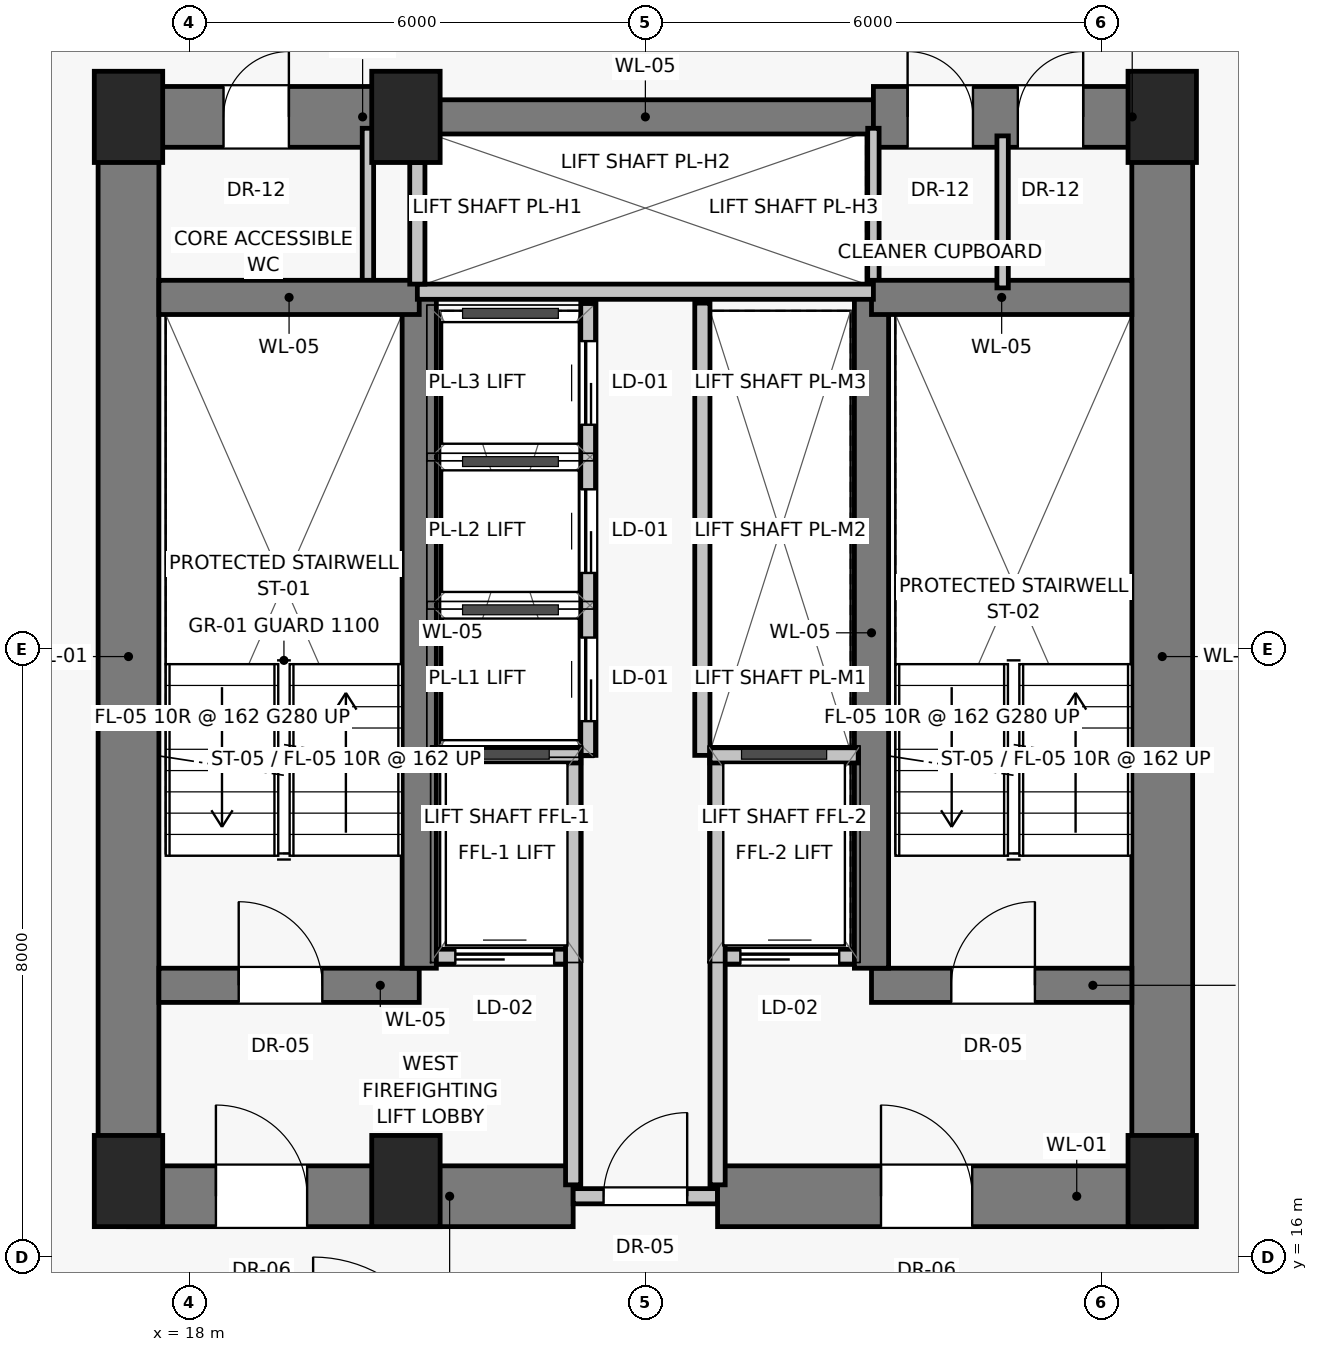
"""IFC4 building model, lengths in metres.
Left out: names, types, materials, properties, quantities, classifications, styles, units other than length and angle.
Written with IfcOpenShell. Run it as: python <this file> out.ifc"""

import sys

from ifc_helpers import new_model, si_unit, direction, frame, frame_2d, origin, origin_2d, place, context, subcontext, project, spatial, rectangle, extrude, source, transform, mapped, element, fill, save


model = new_model("IFC4")
c1 = context("Model", 3, precision=1e-05, world=origin(), true_north=direction((0.0, 1.0)))
c2 = subcontext(c1, "Body", "Model", "MODEL_VIEW")
j1 = project(units=[si_unit("LENGTHUNIT", "METRE"), si_unit("PLANEANGLEUNIT", "RADIAN")], contexts=[c1])
p1 = place(None, origin())
s1 = spatial("IfcSite", under=j1, at=p1, CompositionType="ELEMENT")
p2 = place(p1, origin())
s2 = spatial("IfcBuilding", under=s1, at=p2, CompositionType="ELEMENT")
p3 = place(p2, frame((0.0, 0.0, 53.3)))
s3 = spatial("IfcBuildingStorey", under=s2, at=p3, CompositionType="ELEMENT", Elevation=53.3)
for number, where, z_axis, x_axis in (
    (1, (17.2, 17.0, 0.0), (0.0, 0.0, 1.0), (1.0, 0.0, 0.0)),
    (2, (20.85, 17.0, 0.0), (0.0, 0.0, 1.0), (1.0, 0.0, 0.0)),
    (3, (30.8, 17.0, 0.0), (0.0, 0.0, 1.0), (1.0, 0.0, 0.0)),
    (4, (17.2, 31.0, 0.0), (0.0, 0.0, 1.0), (1.0, 0.0, 0.0)),
    (5, (20.85, 31.0, 0.0), (0.0, 0.0, 1.0), (1.0, 0.0, 0.0)),
    (6, (30.8, 31.0, 0.0), (0.0, 0.0, 1.0), (1.0, 0.0, 0.0)),
):
    element("IfcColumn", number, at=place(p3, frame(where, z_axis=z_axis, x_axis=x_axis)), inside=s3, PredefinedType="PILASTER", context=c2, shape_type="SweptSolid", body=[
        extrude(rectangle(XDim=0.9, YDim=1.2, at=origin_2d()), origin(), (0.0, 0.0, 1.0), 3.25),
    ])
for number, where, z_axis, x_axis in (
    (7, (17.2, 16.8, 0.0), (0.0, 0.0, 1.0), (0.0, 1.0, 0.0)),
    (8, (30.8, 16.8, 0.0), (0.0, 0.0, 1.0), (0.0, 1.0, 0.0)),
):
    element("IfcWall", number, at=place(p3, frame(where, z_axis=z_axis, x_axis=x_axis)), inside=s3, PredefinedType="SHEAR", context=c2, shape_type="SweptSolid", body=[
        extrude(rectangle(XDim=14.2, YDim=0.8, at=frame_2d((7.1, 0.0))), origin(), (0.0, 0.0, 1.0), 2.97),
    ])
p4 = place(p3, frame((17.2, 16.8, 0.0), z_axis=(0.0, 0.0, 1.0), x_axis=(1.0, 0.0, 0.0)))
e9 = element("IfcWall", 9, at=p4, inside=s3, PredefinedType="SHEAR", context=c2, shape_type="SweptSolid", body=[
    extrude(rectangle(XDim=5.85, YDim=0.8, at=frame_2d((2.925, 0.0))), origin(), (0.0, 0.0, 1.0), 2.97),
])
p5 = place(p4, frame((1.15, 0.0, 0.0)))
e10 = element("IfcOpeningElement", 10, at=p5, cuts=e9, PredefinedType="OPENING", context=c2, shape_type="SweptSolid", body=[
    extrude(rectangle(XDim=1.2, YDim=2.03, at=frame_2d((0.6, 1.015))), frame((0.0, 0.41, 0.0), z_axis=(0.0, -1.0, 0.0), x_axis=(1.0, 0.0, 0.0)), (0.0, 0.0, 1.0), 0.82),
])
p6 = place(p3, frame((23.05, 16.8, 0.0), z_axis=(0.0, 0.0, 1.0), x_axis=(1.0, 0.0, 0.0)))
e11 = element("IfcWall", 11, at=p6, inside=s3, PredefinedType="SOLIDWALL", context=c2, shape_type="SweptSolid", body=[
    extrude(rectangle(XDim=1.9, YDim=0.2, at=frame_2d((0.95, 0.0))), origin(), (0.0, 0.0, 1.0), 2.12),
])
p7 = place(p6, frame((0.4, 0.0, 0.0)))
e12 = element("IfcOpeningElement", 12, at=p7, cuts=e11, PredefinedType="OPENING", context=c2, shape_type="SweptSolid", body=[
    extrude(rectangle(XDim=1.1, YDim=2.03, at=frame_2d((0.55, 1.015))), frame((0.0, 0.11, 0.0), z_axis=(0.0, -1.0, 0.0), x_axis=(1.0, 0.0, 0.0)), (0.0, 0.0, 1.0), 0.22),
])
p8 = place(p3, frame((24.95, 16.8, 0.0), z_axis=(0.0, 0.0, 1.0), x_axis=(1.0, 0.0, 0.0)))
e13 = element("IfcWall", 13, at=p8, inside=s3, PredefinedType="SHEAR", context=c2, shape_type="SweptSolid", body=[
    extrude(rectangle(XDim=5.85, YDim=0.8, at=frame_2d((2.925, 0.0))), origin(), (0.0, 0.0, 1.0), 2.97),
])
p9 = place(p8, frame((2.15, 0.0, 0.0)))
e14 = element("IfcOpeningElement", 14, at=p9, cuts=e13, PredefinedType="OPENING", context=c2, shape_type="SweptSolid", body=[
    extrude(rectangle(XDim=1.2, YDim=2.03, at=frame_2d((0.6, 1.015))), frame((0.0, 0.41, 0.0), z_axis=(0.0, -1.0, 0.0), x_axis=(1.0, 0.0, 0.0)), (0.0, 0.0, 1.0), 0.82),
])
p10 = place(p3, frame((17.2, 31.0, 0.0), z_axis=(0.0, 0.0, 1.0), x_axis=(1.0, 0.0, 0.0)))
e15 = element("IfcWall", 15, at=p10, inside=s3, PredefinedType="SHEAR", context=c2, shape_type="SweptSolid", body=[
    extrude(rectangle(XDim=3.8, YDim=0.8, at=frame_2d((1.9, 0.0))), origin(), (0.0, 0.0, 1.0), 2.97),
])
p11 = place(p10, frame((1.25, 0.0, 0.0)))
e16 = element("IfcOpeningElement", 16, at=p11, cuts=e15, PredefinedType="OPENING", context=c2, shape_type="SweptSolid", body=[
    extrude(rectangle(XDim=0.86, YDim=2.01, at=frame_2d((0.43, 1.005))), frame((0.0, 0.41, 0.0), z_axis=(0.0, -1.0, 0.0), x_axis=(1.0, 0.0, 0.0)), (0.0, 0.0, 1.0), 0.82),
])
p12 = place(p3, frame((21.0, 31.0, 0.0), z_axis=(0.0, 0.0, 1.0), x_axis=(1.0, 0.0, 0.0)))
e17 = element("IfcWall", 17, at=p12, inside=s3, PredefinedType="SHEAR", context=c2, shape_type="SweptSolid", body=[
    extrude(rectangle(XDim=6.0, YDim=0.45, at=frame_2d((3.0, 0.0))), origin(), (0.0, 0.0, 1.0), 2.97),
])
p13 = place(p3, frame((27.0, 31.0, 0.0), z_axis=(0.0, 0.0, 1.0), x_axis=(1.0, 0.0, 0.0)))
e18 = element("IfcWall", 18, at=p13, inside=s3, PredefinedType="SHEAR", context=c2, shape_type="SweptSolid", body=[
    extrude(rectangle(XDim=3.8, YDim=0.8, at=frame_2d((1.9, 0.0))), origin(), (0.0, 0.0, 1.0), 2.97),
])
p14 = place(p13, frame((0.45, 0.0, 0.0)))
e19 = element("IfcOpeningElement", 19, at=p14, cuts=e18, PredefinedType="OPENING", context=c2, shape_type="SweptSolid", body=[
    extrude(rectangle(XDim=0.86, YDim=2.01, at=frame_2d((0.43, 1.005))), frame((0.0, 0.41, 0.0), z_axis=(0.0, -1.0, 0.0), x_axis=(1.0, 0.0, 0.0)), (0.0, 0.0, 1.0), 0.82),
])
p15 = place(p13, frame((1.9, 0.0, 0.0)))
e20 = element("IfcOpeningElement", 20, at=p15, cuts=e18, PredefinedType="OPENING", context=c2, shape_type="SweptSolid", body=[
    extrude(rectangle(XDim=0.86, YDim=2.01, at=frame_2d((0.43, 1.005))), frame((0.0, 0.41, 0.0), z_axis=(0.0, -1.0, 0.0), x_axis=(1.0, 0.0, 0.0)), (0.0, 0.0, 1.0), 0.82),
])
for number, where, z_axis, x_axis in (
    (21, (20.35, 28.65, 0.0), (0.0, 0.0, 1.0), (0.0, 1.0, 0.0)),
    (22, (27.0, 28.65, 0.0), (0.0, 0.0, 1.0), (0.0, 1.0, 0.0)),
):
    element("IfcWall", number, at=place(p3, frame(where, z_axis=z_axis, x_axis=x_axis)), inside=s3, PredefinedType="PARTITIONING", context=c2, shape_type="SweptSolid", body=[
        extrude(rectangle(XDim=2.2, YDim=0.15, at=frame_2d((1.1, 0.0))), origin(), (0.0, 0.0, 1.0), 2.97),
    ])
p16 = place(p3, frame((17.6, 19.575, 0.0), z_axis=(0.0, 0.0, 1.0), x_axis=(1.0, 0.0, 0.0)))
e23 = element("IfcWall", 23, at=p16, inside=s3, PredefinedType="SHEAR", context=c2, shape_type="SweptSolid", body=[
    extrude(rectangle(XDim=3.425, YDim=0.45, at=frame_2d((1.712, 0.0))), origin(), (0.0, 0.0, 1.0), 2.97),
])
p17 = place(p16, frame((1.05, 0.0, 0.0)))
e24 = element("IfcOpeningElement", 24, at=p17, cuts=e23, PredefinedType="OPENING", context=c2, shape_type="SweptSolid", body=[
    extrude(rectangle(XDim=1.1, YDim=2.03, at=frame_2d((0.55, 1.015))), frame((0.0, 0.235, 0.0), z_axis=(0.0, -1.0, 0.0), x_axis=(1.0, 0.0, 0.0)), (0.0, 0.0, 1.0), 0.47),
])
p18 = place(p3, frame((21.2, 19.95, 0.0), z_axis=(0.0, 0.0, 1.0), x_axis=(1.0, 0.0, 0.0)))
e25 = element("IfcWall", 25, at=p18, inside=s3, PredefinedType="SOLIDWALL", context=c2, shape_type="SweptSolid", body=[
    extrude(rectangle(XDim=1.85, YDim=0.2, at=frame_2d((0.925, 0.0))), origin(), (0.0, 0.0, 1.0), 2.97),
])
p19 = place(p18, frame((0.3, 0.0, 0.0)))
e26 = element("IfcOpeningElement", 26, at=p19, cuts=e25, PredefinedType="OPENING", context=c2, shape_type="SweptSolid", body=[
    extrude(rectangle(XDim=1.3, YDim=2.25, at=frame_2d((0.65, 1.125))), frame((0.0, 0.11, 0.0), z_axis=(0.0, -1.0, 0.0), x_axis=(1.0, 0.0, 0.0)), (0.0, 0.0, 1.0), 0.22),
])
p20 = place(p3, frame((24.95, 19.95, 0.0), z_axis=(0.0, 0.0, 1.0), x_axis=(1.0, 0.0, 0.0)))
e27 = element("IfcWall", 27, at=p20, inside=s3, PredefinedType="SOLIDWALL", context=c2, shape_type="SweptSolid", body=[
    extrude(rectangle(XDim=1.85, YDim=0.2, at=frame_2d((0.925, 0.0))), origin(), (0.0, 0.0, 1.0), 2.97),
])
p21 = place(p20, frame((0.3, 0.0, 0.0)))
e28 = element("IfcOpeningElement", 28, at=p21, cuts=e27, PredefinedType="OPENING", context=c2, shape_type="SweptSolid", body=[
    extrude(rectangle(XDim=1.3, YDim=2.25, at=frame_2d((0.65, 1.125))), frame((0.0, 0.11, 0.0), z_axis=(0.0, -1.0, 0.0), x_axis=(1.0, 0.0, 0.0)), (0.0, 0.0, 1.0), 0.22),
])
p22 = place(p3, frame((26.975, 19.575, 0.0), z_axis=(0.0, 0.0, 1.0), x_axis=(1.0, 0.0, 0.0)))
e29 = element("IfcWall", 29, at=p22, inside=s3, PredefinedType="SHEAR", context=c2, shape_type="SweptSolid", body=[
    extrude(rectangle(XDim=3.425, YDim=0.45, at=frame_2d((1.712, 0.0))), origin(), (0.0, 0.0, 1.0), 2.97),
])
p23 = place(p22, frame((1.05, 0.0, 0.0)))
e30 = element("IfcOpeningElement", 30, at=p23, cuts=e29, PredefinedType="OPENING", context=c2, shape_type="SweptSolid", body=[
    extrude(rectangle(XDim=1.1, YDim=2.03, at=frame_2d((0.55, 1.015))), frame((0.0, 0.235, 0.0), z_axis=(0.0, -1.0, 0.0), x_axis=(1.0, 0.0, 0.0)), (0.0, 0.0, 1.0), 0.47),
])
for number, where, z_axis, x_axis in (
    (31, (21.025, 19.8, 0.0), (0.0, 0.0, 1.0), (0.0, 1.0, 0.0)),
    (32, (26.975, 19.8, 0.0), (0.0, 0.0, 1.0), (0.0, 1.0, 0.0)),
):
    element("IfcWall", number, at=place(p3, frame(where, z_axis=z_axis, x_axis=x_axis)), inside=s3, PredefinedType="SHEAR", context=c2, shape_type="SweptSolid", body=[
        extrude(rectangle(XDim=8.825, YDim=0.45, at=frame_2d((4.413, 0.0))), origin(), (0.0, 0.0, 1.0), 2.97),
    ])
for number, where, z_axis, x_axis in (
    (33, (17.6, 28.625, 0.0), (0.0, 0.0, 1.0), (1.0, 0.0, 0.0)),
    (34, (26.975, 28.625, 0.0), (0.0, 0.0, 1.0), (1.0, 0.0, 0.0)),
):
    element("IfcWall", number, at=place(p3, frame(where, z_axis=z_axis, x_axis=x_axis)), inside=s3, PredefinedType="SHEAR", context=c2, shape_type="SweptSolid", body=[
        extrude(rectangle(XDim=3.425, YDim=0.45, at=frame_2d((1.712, 0.0))), origin(), (0.0, 0.0, 1.0), 2.97),
    ])
for number, where, z_axis, x_axis in (
    (35, (23.05, 16.95, 0.0), (0.0, 0.0, 1.0), (0.0, 1.0, 0.0)),
    (36, (24.95, 16.95, 0.0), (0.0, 0.0, 1.0), (0.0, 1.0, 0.0)),
):
    element("IfcWall", number, at=place(p3, frame(where, z_axis=z_axis, x_axis=x_axis)), inside=s3, PredefinedType="SOLIDWALL", context=c2, shape_type="SweptSolid", body=[
        extrude(rectangle(XDim=5.6, YDim=0.2, at=frame_2d((2.8, 0.0))), origin(), (0.0, 0.0, 1.0), 2.97),
    ])
for number, where, z_axis, x_axis in (
    (37, (21.2, 22.6, 0.0), (0.0, 0.0, 1.0), (1.0, 0.0, 0.0)),
    (38, (24.85, 22.6, 0.0), (0.0, 0.0, 1.0), (1.0, 0.0, 0.0)),
):
    element("IfcWall", number, at=place(p3, frame(where, z_axis=z_axis, x_axis=x_axis)), inside=s3, PredefinedType="SOLIDWALL", context=c2, shape_type="SweptSolid", body=[
        extrude(rectangle(XDim=1.95, YDim=0.2, at=frame_2d((0.975, 0.0))), origin(), (0.0, 0.0, 1.0), 2.97),
    ])
p24 = place(p3, frame((21.0, 28.7, 0.0), z_axis=(0.0, 0.0, 1.0), x_axis=(1.0, 0.0, 0.0)))
e39 = element("IfcWall", 39, at=p24, inside=s3, PredefinedType="SOLIDWALL", context=c2, shape_type="SweptSolid", body=[
    extrude(rectangle(XDim=6.0, YDim=0.2, at=frame_2d((3.0, 0.0))), origin(), (0.0, 0.0, 1.0), 2.97),
])
p25 = place(p3, frame((21.0, 28.8, 0.0), z_axis=(0.0, 0.0, 1.0), x_axis=(0.0, 1.0, 0.0)))
e40 = element("IfcWall", 40, at=p25, inside=s3, PredefinedType="SOLIDWALL", context=c2, shape_type="SweptSolid", body=[
    extrude(rectangle(XDim=1.6, YDim=0.2, at=frame_2d((0.8, 0.0))), origin(), (0.0, 0.0, 1.0), 2.97),
])
p26 = place(p3, frame((23.25, 22.6, 0.0), z_axis=(0.0, 0.0, 1.0), x_axis=(0.0, 1.0, 0.0)))
e41 = element("IfcWall", 41, at=p26, inside=s3, PredefinedType="SOLIDWALL", context=c2, shape_type="SweptSolid", body=[
    extrude(rectangle(XDim=5.95, YDim=0.2, at=frame_2d((2.975, 0.0))), origin(), (0.0, 0.0, 1.0), 2.97),
])
p27 = place(p26, frame((0.45, 0.0, 0.0)))
e42 = element("IfcOpeningElement", 42, at=p27, cuts=e41, PredefinedType="OPENING", context=c2, shape_type="SweptSolid", body=[
    extrude(rectangle(XDim=1.1, YDim=2.08, at=frame_2d((0.55, 1.04))), frame((0.0, 0.11, 0.0), z_axis=(0.0, -1.0, 0.0), x_axis=(1.0, 0.0, 0.0)), (0.0, 0.0, 1.0), 0.22),
])
p28 = place(p26, frame((2.4, 0.0, 0.0)))
e43 = element("IfcOpeningElement", 43, at=p28, cuts=e41, PredefinedType="OPENING", context=c2, shape_type="SweptSolid", body=[
    extrude(rectangle(XDim=1.1, YDim=2.08, at=frame_2d((0.55, 1.04))), frame((0.0, 0.11, 0.0), z_axis=(0.0, -1.0, 0.0), x_axis=(1.0, 0.0, 0.0)), (0.0, 0.0, 1.0), 0.22),
])
p29 = place(p26, frame((4.35, 0.0, 0.0)))
e44 = element("IfcOpeningElement", 44, at=p29, cuts=e41, PredefinedType="OPENING", context=c2, shape_type="SweptSolid", body=[
    extrude(rectangle(XDim=1.1, YDim=2.08, at=frame_2d((0.55, 1.04))), frame((0.0, 0.11, 0.0), z_axis=(0.0, -1.0, 0.0), x_axis=(1.0, 0.0, 0.0)), (0.0, 0.0, 1.0), 0.22),
])
p30 = place(p3, frame((24.75, 22.6, 0.0), z_axis=(0.0, 0.0, 1.0), x_axis=(0.0, 1.0, 0.0)))
e45 = element("IfcWall", 45, at=p30, inside=s3, PredefinedType="SOLIDWALL", context=c2, shape_type="SweptSolid", body=[
    extrude(rectangle(XDim=5.95, YDim=0.2, at=frame_2d((2.975, 0.0))), origin(), (0.0, 0.0, 1.0), 2.97),
])
p31 = place(p3, frame((28.7, 28.75, 0.0), z_axis=(0.0, 0.0, 1.0), x_axis=(0.0, 1.0, 0.0)))
e46 = element("IfcWall", 46, at=p31, inside=s3, PredefinedType="PARTITIONING", context=c2, shape_type="SweptSolid", body=[
    extrude(rectangle(XDim=2.0, YDim=0.15, at=frame_2d((1.0, 0.0))), origin(), (0.0, 0.0, 1.0), 2.97),
])
m1 = source(origin(), c2, "Body", "SweptSolid", [
    extrude(rectangle(XDim=1.2, YDim=2.03, at=frame_2d((0.6, 1.015))), frame((0.0, 0.025, 0.0), z_axis=(0.0, -1.0, 0.0), x_axis=(1.0, 0.0, 0.0)), (0.0, 0.0, 1.0), 0.05),
])
p32 = place(p5, origin())
e47 = element("IfcDoor", 47, at=p32, inside=s3, OperationType="SINGLE_SWING_LEFT", PredefinedType="DOOR", context=c2, shape_type="MappedRepresentation", body=[
    mapped(m1, transform((0.0, 0.0, 0.0), scale=1.0)),
])
fill(e10, e47)
m2 = source(origin(), c2, "Body", "SweptSolid", [
    extrude(rectangle(XDim=1.1, YDim=2.03, at=frame_2d((0.55, 1.015))), frame((0.0, 0.025, 0.0), z_axis=(0.0, -1.0, 0.0), x_axis=(1.0, 0.0, 0.0)), (0.0, 0.0, 1.0), 0.05),
])
p33 = place(p7, origin())
e48 = element("IfcDoor", 48, at=p33, inside=s3, OperationType="SINGLE_SWING_RIGHT", PredefinedType="DOOR", context=c2, shape_type="MappedRepresentation", body=[
    mapped(m2, transform((0.0, 0.0, 0.0), scale=1.0)),
])
fill(e12, e48)
p34 = place(p9, origin())
e49 = element("IfcDoor", 49, at=p34, inside=s3, OperationType="SINGLE_SWING_LEFT", PredefinedType="DOOR", context=c2, shape_type="MappedRepresentation", body=[
    mapped(m1, transform((0.0, 0.0, 0.0), scale=1.0)),
])
fill(e14, e49)
m3 = source(origin(), c2, "Body", "SweptSolid", [
    extrude(rectangle(XDim=0.86, YDim=2.01, at=frame_2d((0.43, 1.005))), frame((0.0, 0.025, 0.0), z_axis=(0.0, -1.0, 0.0), x_axis=(1.0, 0.0, 0.0)), (0.0, 0.0, 1.0), 0.05),
])
p35 = place(p11, origin())
e50 = element("IfcDoor", 50, at=p35, inside=s3, OperationType="SINGLE_SWING_RIGHT", PredefinedType="DOOR", context=c2, shape_type="MappedRepresentation", body=[
    mapped(m3, transform((0.0, 0.0, 0.0), scale=1.0)),
])
fill(e16, e50)
p36 = place(p14, origin())
e51 = element("IfcDoor", 51, at=p36, inside=s3, OperationType="SINGLE_SWING_LEFT", PredefinedType="DOOR", context=c2, shape_type="MappedRepresentation", body=[
    mapped(m3, transform((0.0, 0.0, 0.0), scale=1.0)),
])
fill(e19, e51)
p37 = place(p15, origin())
e52 = element("IfcDoor", 52, at=p37, inside=s3, OperationType="SINGLE_SWING_RIGHT", PredefinedType="DOOR", context=c2, shape_type="MappedRepresentation", body=[
    mapped(m3, transform((0.0, 0.0, 0.0), scale=1.0)),
])
fill(e20, e52)
p38 = place(p17, origin())
e53 = element("IfcDoor", 53, at=p38, inside=s3, OperationType="SINGLE_SWING_LEFT", PredefinedType="DOOR", context=c2, shape_type="MappedRepresentation", body=[
    mapped(m2, transform((0.0, 0.0, 0.0), scale=1.0)),
])
fill(e24, e53)
m4 = source(origin(), c2, "Body", "SweptSolid", [
    extrude(rectangle(XDim=1.3, YDim=2.25, at=frame_2d((0.65, 1.125))), frame((0.0, 0.025, 0.0), z_axis=(0.0, -1.0, 0.0), x_axis=(1.0, 0.0, 0.0)), (0.0, 0.0, 1.0), 0.05),
])
p39 = place(p19, origin())
e54 = element("IfcDoor", 54, at=p39, inside=s3, OperationType="SLIDING_TO_LEFT", PredefinedType="DOOR", context=c2, shape_type="MappedRepresentation", body=[
    mapped(m4, transform((0.0, 0.0, 0.0), scale=1.0)),
])
fill(e26, e54)
p40 = place(p21, origin())
e55 = element("IfcDoor", 55, at=p40, inside=s3, OperationType="SLIDING_TO_LEFT", PredefinedType="DOOR", context=c2, shape_type="MappedRepresentation", body=[
    mapped(m4, transform((0.0, 0.0, 0.0), scale=1.0)),
])
fill(e28, e55)
p41 = place(p23, origin())
e56 = element("IfcDoor", 56, at=p41, inside=s3, OperationType="SINGLE_SWING_RIGHT", PredefinedType="DOOR", context=c2, shape_type="MappedRepresentation", body=[
    mapped(m2, transform((0.0, 0.0, 0.0), scale=1.0)),
])
fill(e30, e56)
m5 = source(origin(), c2, "Body", "SweptSolid", [
    extrude(rectangle(XDim=1.1, YDim=2.08, at=frame_2d((0.55, 1.04))), frame((0.0, 0.025, 0.0), z_axis=(0.0, -1.0, 0.0), x_axis=(1.0, 0.0, 0.0)), (0.0, 0.0, 1.0), 0.05),
])
p42 = place(p27, origin())
e57 = element("IfcDoor", 57, at=p42, inside=s3, OperationType="SLIDING_TO_LEFT", PredefinedType="DOOR", context=c2, shape_type="MappedRepresentation", body=[
    mapped(m5, transform((0.0, 0.0, 0.0), scale=1.0)),
])
fill(e42, e57)
p43 = place(p28, origin())
e58 = element("IfcDoor", 58, at=p43, inside=s3, OperationType="SLIDING_TO_LEFT", PredefinedType="DOOR", context=c2, shape_type="MappedRepresentation", body=[
    mapped(m5, transform((0.0, 0.0, 0.0), scale=1.0)),
])
fill(e43, e58)
p44 = place(p29, origin())
e59 = element("IfcDoor", 59, at=p44, inside=s3, OperationType="SLIDING_TO_LEFT", PredefinedType="DOOR", context=c2, shape_type="MappedRepresentation", body=[
    mapped(m5, transform((0.0, 0.0, 0.0), scale=1.0)),
])
fill(e44, e59)
save(model, sys.argv[1])
